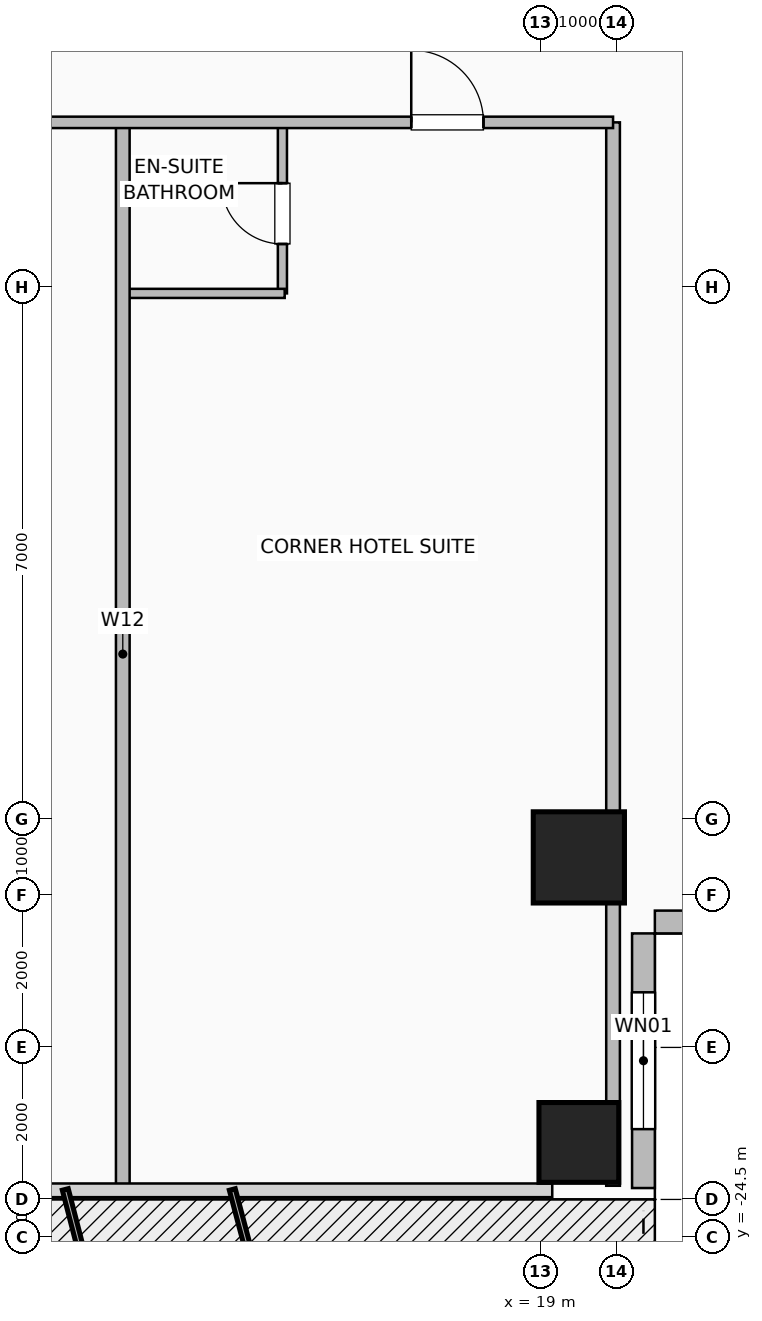
"""IFC4 building model, lengths in metres.
Left out: names, types, materials, properties, quantities, classifications, styles, units other than length and angle.
Written with IfcOpenShell. Run it as: python <this file> out.ifc"""

import sys

from ifc_helpers import new_model, si_unit, direction, frame, frame_2d, origin, origin_2d, place, context, subcontext, project, spatial, rectangle, hollow_rectangle, extrude, element, fill, save


model = new_model("IFC4")
c1 = context("Model", 3, precision=1e-05, world=origin(), true_north=direction((0.0, 1.0)))
c2 = subcontext(c1, "Body", "Model", "MODEL_VIEW")
j1 = project(units=[si_unit("LENGTHUNIT", "METRE"), si_unit("PLANEANGLEUNIT", "RADIAN")], contexts=[c1])
p1 = place(None, origin())
s1 = spatial("IfcSite", under=j1, at=p1, CompositionType="ELEMENT")
p2 = place(p1, origin())
s2 = spatial("IfcBuilding", under=s1, at=p2, CompositionType="ELEMENT")
p3 = place(p2, frame((0.0, 0.0, 27.0)))
s3 = spatial("IfcBuildingStorey", under=s2, at=p3, CompositionType="ELEMENT", Elevation=27.0)
p4 = place(p3, frame((19.5, -23.25, 0.0), z_axis=(0.0, 0.0, 1.0), x_axis=(1.0, 0.0, 0.0)))
e1 = element("IfcColumn", 1, at=p4, inside=s3, PredefinedType="COLUMN", context=c2, shape_type="SweptSolid", body=[
    extrude(hollow_rectangle(XDim=1.05, YDim=1.05, WallThickness=0.05, at=origin_2d()), origin(), (0.0, 0.0, 1.0), 3.5),
])
p5 = place(p3, frame((19.5, -19.5, 0.0), z_axis=(0.0, 0.0, 1.0), x_axis=(1.0, 0.0, 0.0)))
e2 = element("IfcColumn", 2, at=p5, inside=s3, PredefinedType="COLUMN", context=c2, shape_type="SweptSolid", body=[
    extrude(hollow_rectangle(XDim=1.2, YDim=1.2, WallThickness=0.055, at=origin_2d()), origin(), (0.0, 0.0, 1.0), 3.5),
])
p6 = place(p3, frame((20.35, -23.85, 0.0), z_axis=(0.0, 0.0, 1.0), x_axis=(0.0, 1.0, 0.0)))
e3 = element("IfcWall", 3, at=p6, inside=s3, PredefinedType="SOLIDWALL", context=c2, shape_type="SweptSolid", body=[
    extrude(rectangle(XDim=3.35, YDim=0.3, at=frame_2d((1.675, 0.0))), origin(), (0.0, 0.0, 1.0), 3.25),
])
p7 = place(p6, frame((0.775, 0.0, 0.9)))
e4 = element("IfcOpeningElement", 4, at=p7, cuts=e3, PredefinedType="OPENING", context=c2, shape_type="SweptSolid", body=[
    extrude(rectangle(XDim=1.8, YDim=1.8, at=frame_2d((0.9, 0.9))), frame((0.0, 0.16, 0.0), z_axis=(0.0, -1.0, 0.0), x_axis=(1.0, 0.0, 0.0)), (0.0, 0.0, 1.0), 0.32),
])
p8 = place(p3, frame((23.85, -20.35, 0.0), z_axis=(0.0, 0.0, 1.0), x_axis=(-1.0, 0.0, 0.0)))
e5 = element("IfcWall", 5, at=p8, inside=s3, PredefinedType="SOLIDWALL", context=c2, shape_type="SweptSolid", body=[
    extrude(rectangle(XDim=3.35, YDim=0.3, at=frame_2d((1.675, 0.0))), origin(), (0.0, 0.0, 1.0), 3.25),
])
p9 = place(p3, frame((15.6, -12.08, 0.0), z_axis=(0.0, 0.0, 1.0), x_axis=(0.0, 1.0, 0.0)))
e6 = element("IfcWall", 6, at=p9, inside=s3, PredefinedType="PLUMBINGWALL", context=c2, shape_type="SweptSolid", body=[
    extrude(rectangle(XDim=2.25, YDim=0.12, at=frame_2d((1.125, 0.0))), origin(), (0.0, 0.0, 1.0), 3.25),
])
p10 = place(p9, frame((0.65, 0.0, 0.0)))
e7 = element("IfcOpeningElement", 7, at=p10, cuts=e6, PredefinedType="OPENING", context=c2, shape_type="SweptSolid", body=[
    extrude(rectangle(XDim=0.8, YDim=2.05, at=frame_2d((0.4, 1.025))), frame((0.0, 0.07, 0.0), z_axis=(0.0, -1.0, 0.0), x_axis=(1.0, 0.0, 0.0)), (0.0, 0.0, 1.0), 0.14),
])
p11 = place(p3, frame((13.53, -12.08, 0.0), z_axis=(0.0, 0.0, 1.0), x_axis=(1.0, 0.0, 0.0)))
e8 = element("IfcWall", 8, at=p11, inside=s3, PredefinedType="PLUMBINGWALL", context=c2, shape_type="SweptSolid", body=[
    extrude(rectangle(XDim=2.1, YDim=0.12, at=frame_2d((1.05, 0.0))), origin(), (0.0, 0.0, 1.0), 3.25),
])
for number, where, z_axis, x_axis in (
    (9, (13.5, -23.82, 0.0), (0.0, 0.0, 1.0), (0.0, 1.0, 0.0)),
    (10, (19.95, -23.82, 0.0), (0.0, 0.0, 1.0), (0.0, 1.0, 0.0)),
):
    element("IfcWall", number, at=place(p3, frame(where, z_axis=z_axis, x_axis=x_axis)), inside=s3, PredefinedType="PARTITIONING", context=c2, shape_type="SweptSolid", body=[
        extrude(rectangle(XDim=13.99, YDim=0.18, at=frame_2d((6.995, 0.0))), origin(), (0.0, 0.0, 1.0), 3.25),
    ])
p12 = place(p3, frame((-19.95, -9.83, 0.0), z_axis=(0.0, 0.0, 1.0), x_axis=(1.0, 0.0, 0.0)))
e11 = element("IfcWall", 11, at=p12, inside=s3, PredefinedType="PARTITIONING", context=c2, shape_type="SweptSolid", body=[
    extrude(rectangle(XDim=39.9, YDim=0.15, at=frame_2d((19.95, 0.0))), origin(), (0.0, 0.0, 1.0), 3.25),
])
p13 = place(p12, frame((3.945, 0.0, 0.0)))
e12 = element("IfcOpeningElement", 12, at=p13, cuts=e11, PredefinedType="OPENING", context=c2, shape_type="SweptSolid", body=[
    extrude(rectangle(XDim=0.95, YDim=2.08, at=frame_2d((0.475, 1.04))), frame((0.0, 0.085, 0.0), z_axis=(0.0, -1.0, 0.0), x_axis=(1.0, 0.0, 0.0)), (0.0, 0.0, 1.0), 0.17),
])
p14 = place(p12, frame((10.02, 0.0, 0.0)))
e13 = element("IfcOpeningElement", 13, at=p14, cuts=e11, PredefinedType="OPENING", context=c2, shape_type="SweptSolid", body=[
    extrude(rectangle(XDim=0.95, YDim=2.08, at=frame_2d((0.475, 1.04))), frame((0.0, 0.085, 0.0), z_axis=(0.0, -1.0, 0.0), x_axis=(1.0, 0.0, 0.0)), (0.0, 0.0, 1.0), 0.17),
])
p15 = place(p12, frame((15.42, 0.0, 0.0)))
e14 = element("IfcOpeningElement", 14, at=p15, cuts=e11, PredefinedType="OPENING", context=c2, shape_type="SweptSolid", body=[
    extrude(rectangle(XDim=0.95, YDim=2.08, at=frame_2d((0.475, 1.04))), frame((0.0, 0.085, 0.0), z_axis=(0.0, -1.0, 0.0), x_axis=(1.0, 0.0, 0.0)), (0.0, 0.0, 1.0), 0.17),
])
p16 = place(p12, frame((20.702, 0.0, 0.0)))
e15 = element("IfcOpeningElement", 15, at=p16, cuts=e11, PredefinedType="OPENING", context=c2, shape_type="SweptSolid", body=[
    extrude(rectangle(XDim=0.95, YDim=2.08, at=frame_2d((0.475, 1.04))), frame((0.0, 0.085, 0.0), z_axis=(0.0, -1.0, 0.0), x_axis=(1.0, 0.0, 0.0)), (0.0, 0.0, 1.0), 0.17),
])
p17 = place(p12, frame((26.02, 0.0, 0.0)))
e16 = element("IfcOpeningElement", 16, at=p17, cuts=e11, PredefinedType="OPENING", context=c2, shape_type="SweptSolid", body=[
    extrude(rectangle(XDim=0.95, YDim=2.08, at=frame_2d((0.475, 1.04))), frame((0.0, 0.085, 0.0), z_axis=(0.0, -1.0, 0.0), x_axis=(1.0, 0.0, 0.0)), (0.0, 0.0, 1.0), 0.17),
])
p18 = place(p12, frame((31.37, 0.0, 0.0)))
e17 = element("IfcOpeningElement", 17, at=p18, cuts=e11, PredefinedType="OPENING", context=c2, shape_type="SweptSolid", body=[
    extrude(rectangle(XDim=0.95, YDim=2.08, at=frame_2d((0.475, 1.04))), frame((0.0, 0.085, 0.0), z_axis=(0.0, -1.0, 0.0), x_axis=(1.0, 0.0, 0.0)), (0.0, 0.0, 1.0), 0.17),
])
p19 = place(p12, frame((37.245, 0.0, 0.0)))
e18 = element("IfcOpeningElement", 18, at=p19, cuts=e11, PredefinedType="OPENING", context=c2, shape_type="SweptSolid", body=[
    extrude(rectangle(XDim=0.95, YDim=2.08, at=frame_2d((0.475, 1.04))), frame((0.0, 0.085, 0.0), z_axis=(0.0, -1.0, 0.0), x_axis=(1.0, 0.0, 0.0)), (0.0, 0.0, 1.0), 0.17),
])
p20 = place(p7, origin())
e19 = element("IfcWindow", 19, at=p20, inside=s3, PartitioningType="SINGLE_PANEL", PredefinedType="WINDOW", context=c2, shape_type="SweptSolid", body=[
    extrude(rectangle(XDim=1.8, YDim=1.8, at=frame_2d((0.9, 0.9))), frame((0.0, 0.03, 0.0), z_axis=(0.0, -1.0, 0.0), x_axis=(1.0, 0.0, 0.0)), (0.0, 0.0, 1.0), 0.06),
])
fill(e4, e19)
p21 = place(p10, origin())
e20 = element("IfcDoor", 20, at=p21, inside=s3, OperationType="SINGLE_SWING_RIGHT", PredefinedType="DOOR", context=c2, shape_type="SweptSolid", body=[
    extrude(rectangle(XDim=0.8, YDim=2.05, at=frame_2d((0.4, 1.025))), frame((0.0, 0.025, 0.0), z_axis=(0.0, -1.0, 0.0), x_axis=(1.0, 0.0, 0.0)), (0.0, 0.0, 1.0), 0.05),
])
fill(e7, e20)
p22 = place(p19, origin())
e21 = element("IfcDoor", 21, at=p22, inside=s3, OperationType="SINGLE_SWING_LEFT", PredefinedType="DOOR", context=c2, shape_type="SweptSolid", body=[
    extrude(rectangle(XDim=0.95, YDim=2.08, at=frame_2d((0.475, 1.04))), frame((0.0, 0.025, 0.0), z_axis=(0.0, -1.0, 0.0), x_axis=(1.0, 0.0, 0.0)), (0.0, 0.0, 1.0), 0.05),
])
fill(e18, e21)
save(model, sys.argv[1])
